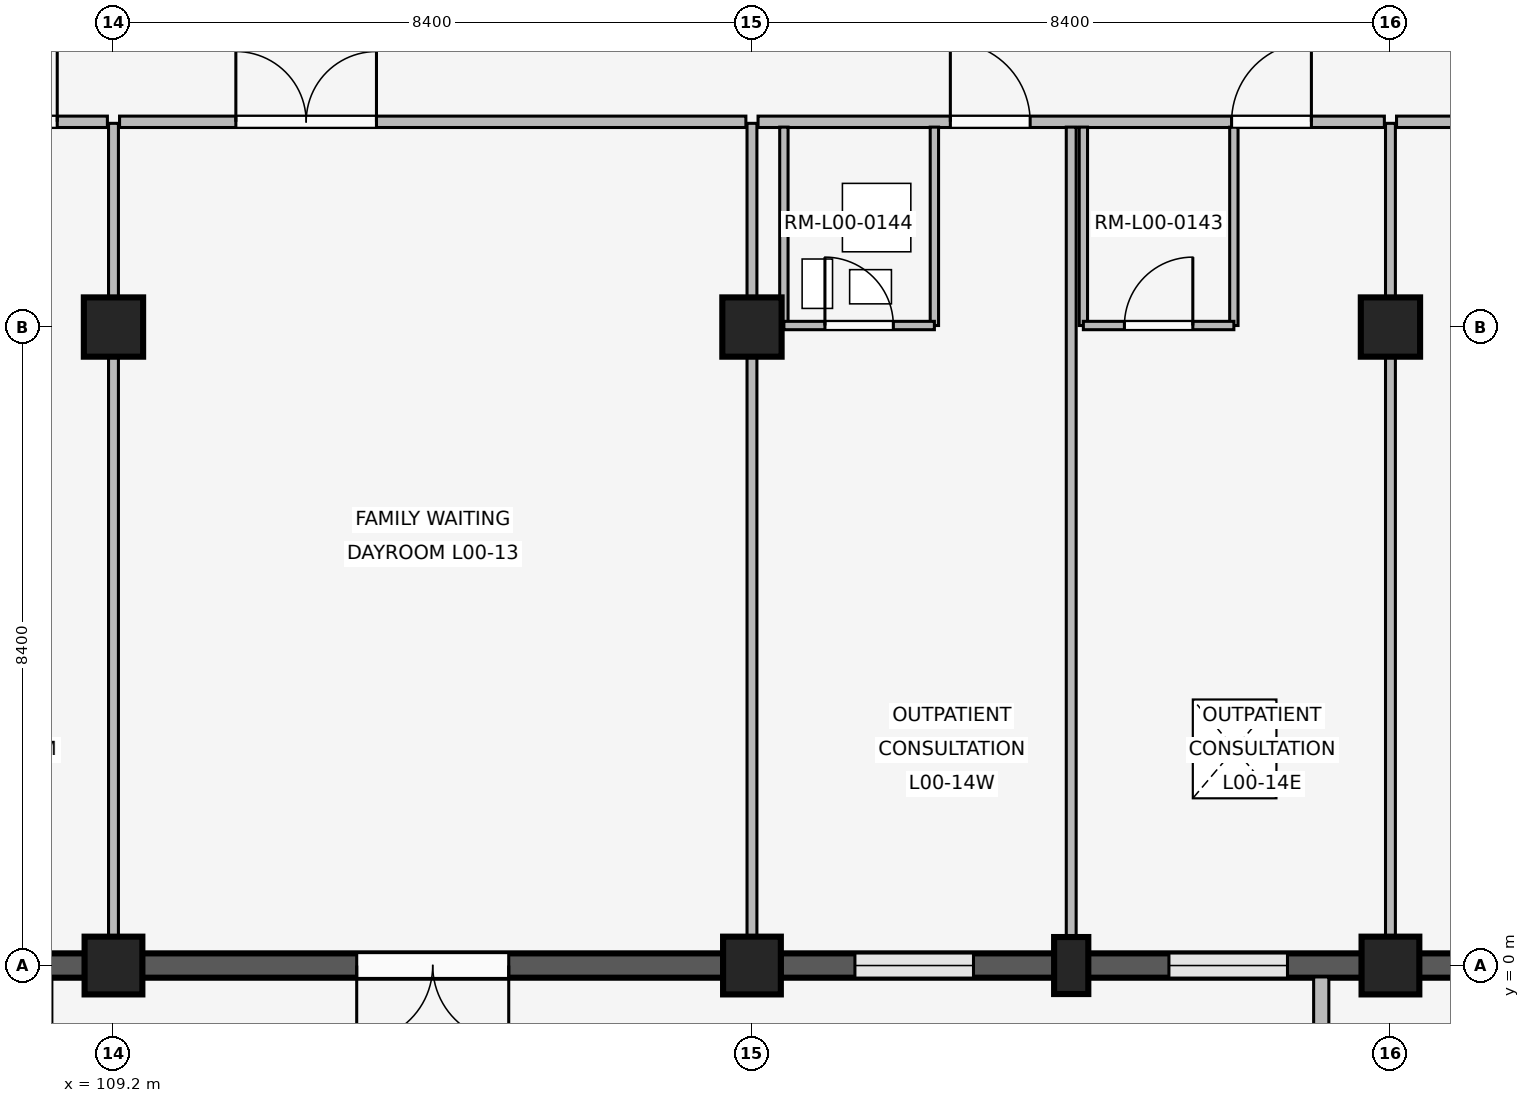
"""IFC4 building model, lengths in metres.
Left out: names, types, materials, properties, quantities, classifications, styles, units other than length and angle.
Written with IfcOpenShell. Run it as: python <this file> out.ifc"""

import sys

from ifc_helpers import new_model, si_unit, direction, frame, frame_2d, origin, origin_2d, place, context, subcontext, project, spatial, rectangle, extrude, element, fill, save


model = new_model("IFC4")
c1 = context("Model", 3, precision=1e-05, world=origin(), true_north=direction((0.0, 1.0)))
c2 = subcontext(c1, "Body", "Model", "MODEL_VIEW")
j1 = project(units=[si_unit("LENGTHUNIT", "METRE"), si_unit("PLANEANGLEUNIT", "RADIAN")], contexts=[c1])
p1 = place(None, origin())
s1 = spatial("IfcSite", under=j1, at=p1, CompositionType="ELEMENT")
p2 = place(p1, origin())
s2 = spatial("IfcBuilding", under=s1, at=p2, CompositionType="ELEMENT")
p3 = place(p2, origin())
s3 = spatial("IfcBuildingStorey", under=s2, at=p3, CompositionType="ELEMENT", Elevation=0.0)
p4 = place(p3, frame((109.2, 0.0, 0.0), z_axis=(0.0, 0.0, 1.0), x_axis=(1.0, 0.0, 0.0)))
e1 = element("IfcColumn", 1, at=p4, inside=s3, PredefinedType="COLUMN", context=c2, shape_type="SweptSolid", body=[
    extrude(rectangle(XDim=0.76, YDim=0.76, at=origin_2d()), origin(), (0.0, 0.0, 1.0), 4.8),
])
p5 = place(p3, frame((109.2, 8.4, 0.0), z_axis=(0.0, 0.0, 1.0), x_axis=(1.0, 0.0, 0.0)))
e2 = element("IfcColumn", 2, at=p5, inside=s3, PredefinedType="COLUMN", context=c2, shape_type="SweptSolid", body=[
    extrude(rectangle(XDim=0.78, YDim=0.78, at=origin_2d()), origin(), (0.0, 0.0, 1.0), 4.8),
])
p6 = place(p3, frame((117.6, 0.0, 0.0), z_axis=(0.0, 0.0, 1.0), x_axis=(1.0, 0.0, 0.0)))
e3 = element("IfcColumn", 3, at=p6, inside=s3, PredefinedType="COLUMN", context=c2, shape_type="SweptSolid", body=[
    extrude(rectangle(XDim=0.76, YDim=0.76, at=origin_2d()), origin(), (0.0, 0.0, 1.0), 4.8),
])
p7 = place(p3, frame((117.6, 8.4, 0.0), z_axis=(0.0, 0.0, 1.0), x_axis=(1.0, 0.0, 0.0)))
e4 = element("IfcColumn", 4, at=p7, inside=s3, PredefinedType="COLUMN", context=c2, shape_type="SweptSolid", body=[
    extrude(rectangle(XDim=0.78, YDim=0.78, at=origin_2d()), origin(), (0.0, 0.0, 1.0), 4.8),
])
p8 = place(p3, frame((126.0, 0.0, 0.0), z_axis=(0.0, 0.0, 1.0), x_axis=(1.0, 0.0, 0.0)))
e5 = element("IfcColumn", 5, at=p8, inside=s3, PredefinedType="COLUMN", context=c2, shape_type="SweptSolid", body=[
    extrude(rectangle(XDim=0.76, YDim=0.76, at=origin_2d()), origin(), (0.0, 0.0, 1.0), 4.8),
])
p9 = place(p3, frame((126.0, 8.4, 0.0), z_axis=(0.0, 0.0, 1.0), x_axis=(1.0, 0.0, 0.0)))
e6 = element("IfcColumn", 6, at=p9, inside=s3, PredefinedType="COLUMN", context=c2, shape_type="SweptSolid", body=[
    extrude(rectangle(XDim=0.78, YDim=0.78, at=origin_2d()), origin(), (0.0, 0.0, 1.0), 4.8),
])
p10 = place(p3, frame((121.8, 0.0, 0.0), z_axis=(0.0, 0.0, 1.0), x_axis=(1.0, 0.0, 0.0)))
e7 = element("IfcColumn", 7, at=p10, inside=s3, PredefinedType="PILASTER", context=c2, shape_type="SweptSolid", body=[
    extrude(rectangle(XDim=0.45, YDim=0.75, at=origin_2d()), origin(), (0.0, 0.0, 1.0), 4.8),
])
p11 = place(p3, frame((108.825, 0.0, 0.0), z_axis=(0.0, 0.0, 1.0), x_axis=(-1.0, 0.0, 0.0)))
e8 = element("IfcWall", 8, at=p11, inside=s3, PredefinedType="SOLIDWALL", context=c2, shape_type="SweptSolid", body=[
    extrude(rectangle(XDim=7.65, YDim=0.32, at=frame_2d((3.825, 0.0))), origin(), (0.0, 0.0, 1.0), 3.82),
])
p12 = place(p11, frame((0.919, 0.0, 0.85)))
e9 = element("IfcOpeningElement", 9, at=p12, cuts=e8, PredefinedType="OPENING", context=c2, shape_type="SweptSolid", body=[
    extrude(rectangle(XDim=1.68, YDim=2.05, at=frame_2d((0.84, 1.025))), frame((0.0, 0.17, 0.0), z_axis=(0.0, -1.0, 0.0), x_axis=(1.0, 0.0, 0.0)), (0.0, 0.0, 1.0), 0.34),
])
p13 = place(p11, frame((5.051, 0.0, 0.85)))
e10 = element("IfcOpeningElement", 10, at=p13, cuts=e8, PredefinedType="OPENING", context=c2, shape_type="SweptSolid", body=[
    extrude(rectangle(XDim=1.68, YDim=2.05, at=frame_2d((0.84, 1.025))), frame((0.0, 0.17, 0.0), z_axis=(0.0, -1.0, 0.0), x_axis=(1.0, 0.0, 0.0)), (0.0, 0.0, 1.0), 0.34),
])
p14 = place(p3, frame((117.225, 0.0, 0.0), z_axis=(0.0, 0.0, 1.0), x_axis=(-1.0, 0.0, 0.0)))
e11 = element("IfcWall", 11, at=p14, inside=s3, PredefinedType="SOLIDWALL", context=c2, shape_type="SweptSolid", body=[
    extrude(rectangle(XDim=7.65, YDim=0.32, at=frame_2d((3.825, 0.0))), origin(), (0.0, 0.0, 1.0), 3.82),
])
p15 = place(p14, frame((2.825, 0.0, 0.0)))
e12 = element("IfcOpeningElement", 12, at=p15, cuts=e11, PredefinedType="OPENING", context=c2, shape_type="SweptSolid", body=[
    extrude(rectangle(XDim=2.0, YDim=2.4, at=frame_2d((1.0, 1.2))), frame((0.0, 0.17, 0.0), z_axis=(0.0, -1.0, 0.0), x_axis=(1.0, 0.0, 0.0)), (0.0, 0.0, 1.0), 0.34),
])
p16 = place(p3, frame((125.625, 0.0, 0.0), z_axis=(0.0, 0.0, 1.0), x_axis=(-1.0, 0.0, 0.0)))
e13 = element("IfcWall", 13, at=p16, inside=s3, PredefinedType="SOLIDWALL", context=c2, shape_type="SweptSolid", body=[
    extrude(rectangle(XDim=7.65, YDim=0.32, at=frame_2d((3.825, 0.0))), origin(), (0.0, 0.0, 1.0), 3.82),
])
p17 = place(p16, frame((0.979, 0.0, 0.85)))
e14 = element("IfcOpeningElement", 14, at=p17, cuts=e13, PredefinedType="OPENING", context=c2, shape_type="SweptSolid", body=[
    extrude(rectangle(XDim=1.56, YDim=1.7, at=frame_2d((0.78, 0.85))), frame((0.0, 0.17, 0.0), z_axis=(0.0, -1.0, 0.0), x_axis=(1.0, 0.0, 0.0)), (0.0, 0.0, 1.0), 0.34),
])
p18 = place(p16, frame((5.111, 0.0, 0.85)))
e15 = element("IfcOpeningElement", 15, at=p18, cuts=e13, PredefinedType="OPENING", context=c2, shape_type="SweptSolid", body=[
    extrude(rectangle(XDim=1.56, YDim=1.7, at=frame_2d((0.78, 0.85))), frame((0.0, 0.17, 0.0), z_axis=(0.0, -1.0, 0.0), x_axis=(1.0, 0.0, 0.0)), (0.0, 0.0, 1.0), 0.34),
])
p19 = place(p3, frame((125.09, -0.15, 0.0), z_axis=(0.0, 0.0, 1.0), x_axis=(0.0, -1.0, 0.0)))
e16 = element("IfcWall", 16, at=p19, inside=s3, PredefinedType="ELEMENTEDWALL", context=c2, shape_type="SweptSolid", body=[
    extrude(rectangle(XDim=0.85, YDim=0.2, at=frame_2d((0.425, 0.0))), origin(), (0.0, 0.0, 1.0), 3.8),
])
p20 = place(p3, frame((134.025, 0.0, 0.0), z_axis=(0.0, 0.0, 1.0), x_axis=(-1.0, 0.0, 0.0)))
e17 = element("IfcWall", 17, at=p20, inside=s3, PredefinedType="SOLIDWALL", context=c2, shape_type="SweptSolid", body=[
    extrude(rectangle(XDim=7.65, YDim=0.32, at=frame_2d((3.825, 0.0))), origin(), (0.0, 0.0, 1.0), 3.82),
])
p21 = place(p20, frame((2.825, 0.0, 0.0)))
e18 = element("IfcOpeningElement", 18, at=p21, cuts=e17, PredefinedType="OPENING", context=c2, shape_type="SweptSolid", body=[
    extrude(rectangle(XDim=2.0, YDim=2.4, at=frame_2d((1.0, 1.2))), frame((0.0, 0.17, 0.0), z_axis=(0.0, -1.0, 0.0), x_axis=(1.0, 0.0, 0.0)), (0.0, 0.0, 1.0), 0.34),
])
p22 = place(p3, frame((101.16, 11.1, 0.0), z_axis=(0.0, 0.0, 1.0), x_axis=(1.0, 0.0, 0.0)))
e19 = element("IfcWall", 19, at=p22, inside=s3, PredefinedType="PARTITIONING", context=c2, shape_type="SweptSolid", body=[
    extrude(rectangle(XDim=7.96, YDim=0.15, at=frame_2d((3.98, 0.0))), origin(), (0.0, 0.0, 1.0), 3.8),
])
p23 = place(p22, frame((2.25, 0.0, 0.0)))
e20 = element("IfcOpeningElement", 20, at=p23, cuts=e19, PredefinedType="OPENING", context=c2, shape_type="SweptSolid", body=[
    extrude(rectangle(XDim=1.35, YDim=2.25, at=frame_2d((0.675, 1.125))), frame((0.0, 0.085, 0.0), z_axis=(0.0, -1.0, 0.0), x_axis=(1.0, 0.0, 0.0)), (0.0, 0.0, 1.0), 0.17),
])
p24 = place(p22, frame((5.95, 0.0, 0.0)))
e21 = element("IfcOpeningElement", 21, at=p24, cuts=e19, PredefinedType="OPENING", context=c2, shape_type="SweptSolid", body=[
    extrude(rectangle(XDim=1.35, YDim=2.25, at=frame_2d((0.675, 1.125))), frame((0.0, 0.085, 0.0), z_axis=(0.0, -1.0, 0.0), x_axis=(1.0, 0.0, 0.0)), (0.0, 0.0, 1.0), 0.17),
])
p25 = place(p3, frame((109.2, 0.14, 0.0), z_axis=(0.0, 0.0, 1.0), x_axis=(0.0, 1.0, 0.0)))
e22 = element("IfcWall", 22, at=p25, inside=s3, PredefinedType="PARTITIONING", context=c2, shape_type="SweptSolid", body=[
    extrude(rectangle(XDim=10.94, YDim=0.13, at=frame_2d((5.47, 0.0))), origin(), (0.0, 0.0, 1.0), 3.8),
])
p26 = place(p3, frame((109.28, 11.1, 0.0), z_axis=(0.0, 0.0, 1.0), x_axis=(1.0, 0.0, 0.0)))
e23 = element("IfcWall", 23, at=p26, inside=s3, PredefinedType="PARTITIONING", context=c2, shape_type="SweptSolid", body=[
    extrude(rectangle(XDim=8.24, YDim=0.15, at=frame_2d((4.12, 0.0))), origin(), (0.0, 0.0, 1.0), 3.8),
])
p27 = place(p26, frame((1.53, 0.0, 0.0)))
e24 = element("IfcOpeningElement", 24, at=p27, cuts=e23, PredefinedType="OPENING", context=c2, shape_type="SweptSolid", body=[
    extrude(rectangle(XDim=1.85, YDim=2.3, at=frame_2d((0.925, 1.15))), frame((0.0, 0.085, 0.0), z_axis=(0.0, -1.0, 0.0), x_axis=(1.0, 0.0, 0.0)), (0.0, 0.0, 1.0), 0.17),
])
p28 = place(p3, frame((117.6, 0.14, 0.0), z_axis=(0.0, 0.0, 1.0), x_axis=(0.0, 1.0, 0.0)))
e25 = element("IfcWall", 25, at=p28, inside=s3, PredefinedType="PARTITIONING", context=c2, shape_type="SweptSolid", body=[
    extrude(rectangle(XDim=10.94, YDim=0.13, at=frame_2d((5.47, 0.0))), origin(), (0.0, 0.0, 1.0), 3.8),
])
p29 = place(p3, frame((117.68, 11.1, 0.0), z_axis=(0.0, 0.0, 1.0), x_axis=(1.0, 0.0, 0.0)))
e26 = element("IfcWall", 26, at=p29, inside=s3, PredefinedType="PARTITIONING", context=c2, shape_type="SweptSolid", body=[
    extrude(rectangle(XDim=8.24, YDim=0.15, at=frame_2d((4.12, 0.0))), origin(), (0.0, 0.0, 1.0), 3.8),
])
p30 = place(p29, frame((2.53, 0.0, 0.0)))
e27 = element("IfcOpeningElement", 27, at=p30, cuts=e26, PredefinedType="OPENING", context=c2, shape_type="SweptSolid", body=[
    extrude(rectangle(XDim=1.05, YDim=2.2, at=frame_2d((0.525, 1.1))), frame((0.0, 0.085, 0.0), z_axis=(0.0, -1.0, 0.0), x_axis=(1.0, 0.0, 0.0)), (0.0, 0.0, 1.0), 0.17),
])
p31 = place(p29, frame((6.23, 0.0, 0.0)))
e28 = element("IfcOpeningElement", 28, at=p31, cuts=e26, PredefinedType="OPENING", context=c2, shape_type="SweptSolid", body=[
    extrude(rectangle(XDim=1.05, YDim=2.2, at=frame_2d((0.525, 1.1))), frame((0.0, 0.085, 0.0), z_axis=(0.0, -1.0, 0.0), x_axis=(1.0, 0.0, 0.0)), (0.0, 0.0, 1.0), 0.17),
])
p32 = place(p3, frame((121.8, 0.1, 0.0), z_axis=(0.0, 0.0, 1.0), x_axis=(0.0, 1.0, 0.0)))
e29 = element("IfcWall", 29, at=p32, inside=s3, PredefinedType="PARTITIONING", context=c2, shape_type="SweptSolid", body=[
    extrude(rectangle(XDim=10.93, YDim=0.13, at=frame_2d((5.465, 0.0))), origin(), (0.0, 0.0, 1.0), 3.8),
])
for number, where, z_axis, x_axis in (
    (30, (118.02, 8.42, 0.0), (0.0, 0.0, 1.0), (0.0, 1.0, 0.0)),
    (31, (120.0, 8.42, 0.0), (0.0, 0.0, 1.0), (0.0, 1.0, 0.0)),
):
    element("IfcWall", number, at=place(p3, frame(where, z_axis=z_axis, x_axis=x_axis)), inside=s3, PredefinedType="PARTITIONING", context=c2, shape_type="SweptSolid", body=[
        extrude(rectangle(XDim=2.61, YDim=0.11, at=frame_2d((1.305, 0.0))), origin(), (0.0, 0.0, 1.0), 3.8),
    ])
p33 = place(p3, frame((118.02, 8.42, 0.0), z_axis=(0.0, 0.0, 1.0), x_axis=(1.0, 0.0, 0.0)))
e32 = element("IfcWall", 32, at=p33, inside=s3, PredefinedType="PARTITIONING", context=c2, shape_type="SweptSolid", body=[
    extrude(rectangle(XDim=1.98, YDim=0.11, at=frame_2d((0.99, 0.0))), origin(), (0.0, 0.0, 1.0), 3.8),
])
p34 = place(p33, frame((0.54, 0.0, 0.0)))
e33 = element("IfcOpeningElement", 33, at=p34, cuts=e32, PredefinedType="OPENING", context=c2, shape_type="SweptSolid", body=[
    extrude(rectangle(XDim=0.9, YDim=2.1, at=frame_2d((0.45, 1.05))), frame((0.0, 0.065, 0.0), z_axis=(0.0, -1.0, 0.0), x_axis=(1.0, 0.0, 0.0)), (0.0, 0.0, 1.0), 0.13),
])
for number, where, z_axis, x_axis in (
    (34, (121.96, 8.42, 0.0), (0.0, 0.0, 1.0), (0.0, 1.0, 0.0)),
    (35, (123.94, 8.42, 0.0), (0.0, 0.0, 1.0), (0.0, 1.0, 0.0)),
):
    element("IfcWall", number, at=place(p3, frame(where, z_axis=z_axis, x_axis=x_axis)), inside=s3, PredefinedType="PARTITIONING", context=c2, shape_type="SweptSolid", body=[
        extrude(rectangle(XDim=2.61, YDim=0.11, at=frame_2d((1.305, 0.0))), origin(), (0.0, 0.0, 1.0), 3.8),
    ])
p35 = place(p3, frame((121.96, 8.42, 0.0), z_axis=(0.0, 0.0, 1.0), x_axis=(1.0, 0.0, 0.0)))
e36 = element("IfcWall", 36, at=p35, inside=s3, PredefinedType="PARTITIONING", context=c2, shape_type="SweptSolid", body=[
    extrude(rectangle(XDim=1.98, YDim=0.11, at=frame_2d((0.99, 0.0))), origin(), (0.0, 0.0, 1.0), 3.8),
])
p36 = place(p35, frame((0.54, 0.0, 0.0)))
e37 = element("IfcOpeningElement", 37, at=p36, cuts=e36, PredefinedType="OPENING", context=c2, shape_type="SweptSolid", body=[
    extrude(rectangle(XDim=0.9, YDim=2.1, at=frame_2d((0.45, 1.05))), frame((0.0, 0.065, 0.0), z_axis=(0.0, -1.0, 0.0), x_axis=(1.0, 0.0, 0.0)), (0.0, 0.0, 1.0), 0.13),
])
p37 = place(p3, frame((126.0, 0.14, 0.0), z_axis=(0.0, 0.0, 1.0), x_axis=(0.0, 1.0, 0.0)))
e38 = element("IfcWall", 38, at=p37, inside=s3, PredefinedType="PARTITIONING", context=c2, shape_type="SweptSolid", body=[
    extrude(rectangle(XDim=10.94, YDim=0.13, at=frame_2d((5.47, 0.0))), origin(), (0.0, 0.0, 1.0), 3.8),
])
p38 = place(p3, frame((126.08, 11.1, 0.0), z_axis=(0.0, 0.0, 1.0), x_axis=(1.0, 0.0, 0.0)))
e39 = element("IfcWall", 39, at=p38, inside=s3, PredefinedType="PARTITIONING", context=c2, shape_type="SweptSolid", body=[
    extrude(rectangle(XDim=8.18, YDim=0.15, at=frame_2d((4.09, 0.0))), origin(), (0.0, 0.0, 1.0), 3.8),
])
p39 = place(p38, frame((1.53, 0.0, 0.0)))
e40 = element("IfcOpeningElement", 40, at=p39, cuts=e39, PredefinedType="OPENING", context=c2, shape_type="SweptSolid", body=[
    extrude(rectangle(XDim=1.85, YDim=2.3, at=frame_2d((0.925, 1.15))), frame((0.0, 0.085, 0.0), z_axis=(0.0, -1.0, 0.0), x_axis=(1.0, 0.0, 0.0)), (0.0, 0.0, 1.0), 0.17),
])
p40 = place(p15, origin())
e41 = element("IfcDoor", 41, at=p40, inside=s3, OperationType="DOUBLE_SWING_LEFT", PredefinedType="DOOR", context=c2, shape_type="SweptSolid", body=[
    extrude(rectangle(XDim=2.0, YDim=2.4, at=frame_2d((1.0, 1.2))), frame((0.0, 0.025, 0.0), z_axis=(0.0, -1.0, 0.0), x_axis=(1.0, 0.0, 0.0)), (0.0, 0.0, 1.0), 0.05),
])
fill(e12, e41)
p41 = place(p17, origin())
e42 = element("IfcWindow", 42, at=p41, inside=s3, PartitioningType="SINGLE_PANEL", PredefinedType="WINDOW", context=c2, shape_type="SweptSolid", body=[
    extrude(rectangle(XDim=1.56, YDim=1.7, at=frame_2d((0.78, 0.85))), frame((0.0, 0.03, 0.0), z_axis=(0.0, -1.0, 0.0), x_axis=(1.0, 0.0, 0.0)), (0.0, 0.0, 1.0), 0.06),
])
fill(e14, e42)
p42 = place(p18, origin())
e43 = element("IfcWindow", 43, at=p42, inside=s3, PartitioningType="SINGLE_PANEL", PredefinedType="WINDOW", context=c2, shape_type="SweptSolid", body=[
    extrude(rectangle(XDim=1.56, YDim=1.7, at=frame_2d((0.78, 0.85))), frame((0.0, 0.03, 0.0), z_axis=(0.0, -1.0, 0.0), x_axis=(1.0, 0.0, 0.0)), (0.0, 0.0, 1.0), 0.06),
])
fill(e15, e43)
p43 = place(p24, origin())
e44 = element("IfcDoor", 44, at=p43, inside=s3, OperationType="SINGLE_SWING_RIGHT", PredefinedType="DOOR", context=c2, shape_type="SweptSolid", body=[
    extrude(rectangle(XDim=1.35, YDim=2.25, at=frame_2d((0.675, 1.125))), frame((0.0, 0.025, 0.0), z_axis=(0.0, -1.0, 0.0), x_axis=(1.0, 0.0, 0.0)), (0.0, 0.0, 1.0), 0.05),
])
fill(e21, e44)
p44 = place(p27, origin())
e45 = element("IfcDoor", 45, at=p44, inside=s3, OperationType="DOUBLE_SWING_LEFT", PredefinedType="DOOR", context=c2, shape_type="SweptSolid", body=[
    extrude(rectangle(XDim=1.85, YDim=2.3, at=frame_2d((0.925, 1.15))), frame((0.0, 0.025, 0.0), z_axis=(0.0, -1.0, 0.0), x_axis=(1.0, 0.0, 0.0)), (0.0, 0.0, 1.0), 0.05),
])
fill(e24, e45)
p45 = place(p30, origin())
e46 = element("IfcDoor", 46, at=p45, inside=s3, OperationType="SINGLE_SWING_LEFT", PredefinedType="DOOR", context=c2, shape_type="SweptSolid", body=[
    extrude(rectangle(XDim=1.05, YDim=2.2, at=frame_2d((0.525, 1.1))), frame((0.0, 0.025, 0.0), z_axis=(0.0, -1.0, 0.0), x_axis=(1.0, 0.0, 0.0)), (0.0, 0.0, 1.0), 0.05),
])
fill(e27, e46)
p46 = place(p31, origin())
e47 = element("IfcDoor", 47, at=p46, inside=s3, OperationType="SINGLE_SWING_RIGHT", PredefinedType="DOOR", context=c2, shape_type="SweptSolid", body=[
    extrude(rectangle(XDim=1.05, YDim=2.2, at=frame_2d((0.525, 1.1))), frame((0.0, 0.025, 0.0), z_axis=(0.0, -1.0, 0.0), x_axis=(1.0, 0.0, 0.0)), (0.0, 0.0, 1.0), 0.05),
])
fill(e28, e47)
p47 = place(p34, origin())
e48 = element("IfcDoor", 48, at=p47, inside=s3, OperationType="SINGLE_SWING_LEFT", PredefinedType="DOOR", context=c2, shape_type="SweptSolid", body=[
    extrude(rectangle(XDim=0.9, YDim=2.1, at=frame_2d((0.45, 1.05))), frame((0.0, 0.025, 0.0), z_axis=(0.0, -1.0, 0.0), x_axis=(1.0, 0.0, 0.0)), (0.0, 0.0, 1.0), 0.05),
])
fill(e33, e48)
p48 = place(p36, origin())
e49 = element("IfcDoor", 49, at=p48, inside=s3, OperationType="SINGLE_SWING_RIGHT", PredefinedType="DOOR", context=c2, shape_type="SweptSolid", body=[
    extrude(rectangle(XDim=0.9, YDim=2.1, at=frame_2d((0.45, 1.05))), frame((0.0, 0.025, 0.0), z_axis=(0.0, -1.0, 0.0), x_axis=(1.0, 0.0, 0.0)), (0.0, 0.0, 1.0), 0.05),
])
fill(e37, e49)
save(model, sys.argv[1])
